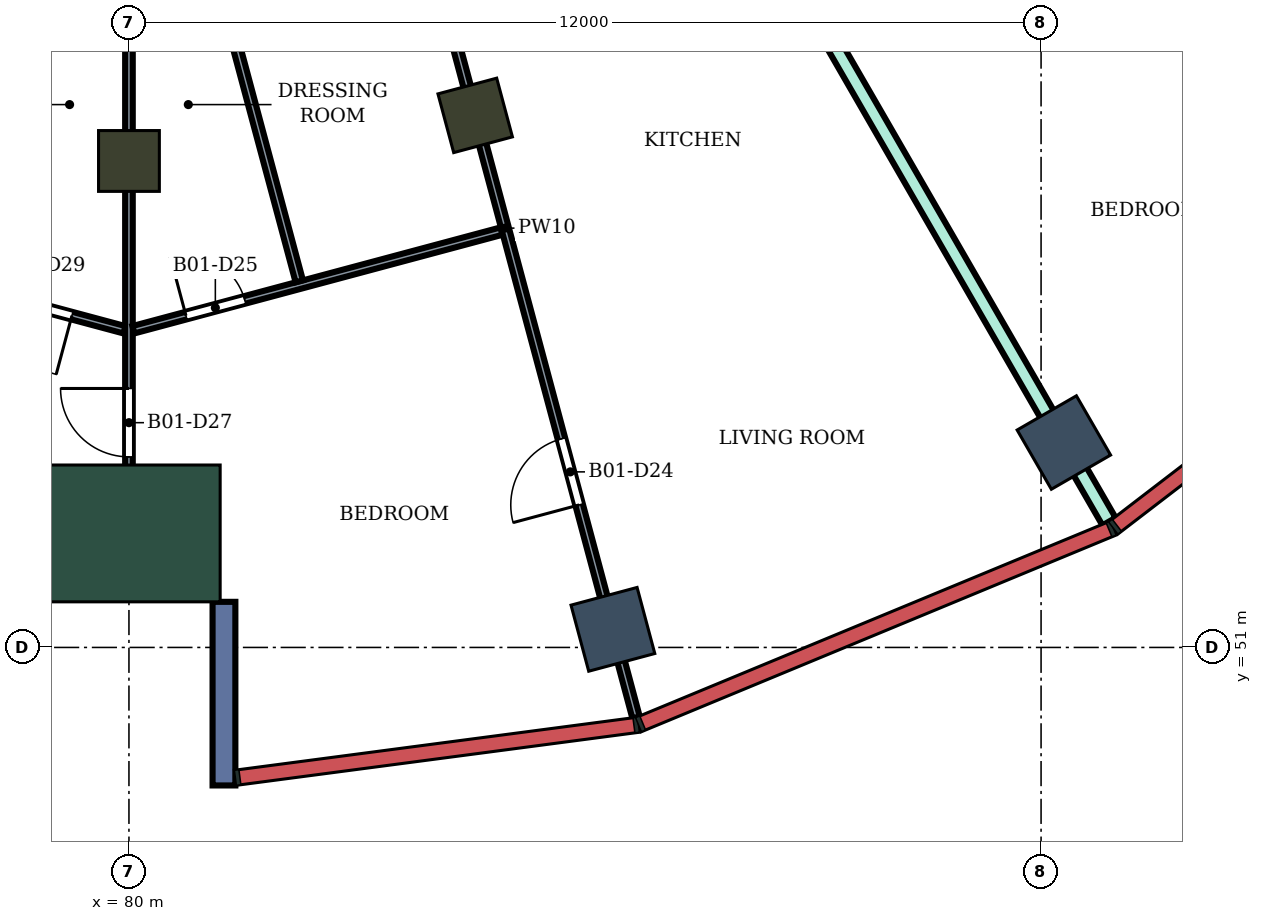
"""IFC4 building model, lengths in metres.
Left out: names, types, materials, properties, quantities, classifications, styles, units other than length and angle.
Written with IfcOpenShell. Run it as: python <this file> out.ifc"""

import sys

from ifc_helpers import new_model, si_unit, direction, frame, frame_2d, origin, origin_2d, place, context, subcontext, project, spatial, rectangle, extrude, element, fill, save


model = new_model("IFC4")
c1 = context("Model", 3, precision=1e-05, world=origin(), true_north=direction((0.0, 1.0)))
c2 = subcontext(c1, "Body", "Model", "MODEL_VIEW")
j1 = project(units=[si_unit("LENGTHUNIT", "METRE"), si_unit("PLANEANGLEUNIT", "RADIAN")], contexts=[c1])
p1 = place(None, origin())
s1 = spatial("IfcSite", under=j1, at=p1, CompositionType="ELEMENT")
p2 = place(p1, origin())
s2 = spatial("IfcBuilding", under=s1, at=p2, CompositionType="ELEMENT")
p3 = place(p2, frame((0.0, 0.0, 216.7)))
s3 = spatial("IfcBuildingStorey", under=s2, at=p3, CompositionType="ELEMENT", Elevation=216.7)
for number, where, z_axis, x_axis in (
    (1, (86.367, 51.238, 0.0), (0.0, 0.0, 1.0), (0.259, -0.966, 0.0)),
    (2, (92.3, 53.696, 0.0), (0.0, 0.0, 1.0), (0.5, -0.866, 0.0)),
):
    element("IfcColumn", number, at=place(p3, frame(where, z_axis=z_axis, x_axis=x_axis)), inside=s3, PredefinedType="COLUMN", context=c2, shape_type="SweptSolid", body=[
        extrude(rectangle(XDim=0.9, YDim=0.9, at=origin_2d()), origin(), (0.0, 0.0, 1.0), 4.2),
    ])
for number, where, z_axis, x_axis in (
    (3, (80.0, 57.4, 0.0), (0.0, 0.0, 1.0), (0.0, -1.0, 0.0)),
    (4, (84.555, 58.0, 0.0), (0.0, 0.0, 1.0), (0.259, -0.966, 0.0)),
):
    element("IfcColumn", number, at=place(p3, frame(where, z_axis=z_axis, x_axis=x_axis)), inside=s3, PredefinedType="COLUMN", context=c2, shape_type="SweptSolid", body=[
        extrude(rectangle(XDim=0.8, YDim=0.8, at=origin_2d()), origin(), (0.0, 0.0, 1.0), 4.2),
    ])
p4 = place(p3, frame((80.0, 52.5, 0.0), z_axis=(0.0, 0.0, 1.0), x_axis=(0.0, -1.0, 0.0)))
e5 = element("IfcColumn", 5, at=p4, inside=s3, PredefinedType="COLUMN", context=c2, shape_type="SweptSolid", body=[
    extrude(rectangle(XDim=1.8, YDim=2.4, at=origin_2d()), origin(), (0.0, 0.0, 1.0), 4.2),
])
p5 = place(p3, frame((81.25, 51.6, 0.0), z_axis=(0.0, 0.0, 1.0), x_axis=(0.0, -1.0, 0.0)))
e6 = element("IfcWall", 6, at=p5, inside=s3, PredefinedType="NOTDEFINED", context=c2, shape_type="SweptSolid", body=[
    extrude(rectangle(XDim=2.416, YDim=0.3, at=frame_2d((1.208, 0.0))), origin(), (0.0, 0.0, 1.0), 4.2),
])
p6 = place(p3, frame((86.463, 63.8, 0.0), z_axis=(0.0, 0.0, 1.0), x_axis=(0.499827034849, -0.866125242234, 0.0)))
e7 = element("IfcWall", 7, at=p6, inside=s3, PredefinedType="PARTITIONING", context=c2, shape_type="SweptSolid", body=[
    extrude(rectangle(XDim=12.866, YDim=0.2, at=frame_2d((6.433, 0.0))), origin(), (0.0, 0.0, 1.0), 3.75),
])
p7 = place(p3, frame((70.188, 57.794, 0.0), z_axis=(0.0, 0.0, 1.0), x_axis=(0.965894620005, -0.25893548047, 0.0)))
e8 = element("IfcWall", 8, at=p7, inside=s3, PredefinedType="PARTITIONING", context=c2, shape_type="SweptSolid", body=[
    extrude(rectangle(XDim=10.098, YDim=0.1, at=frame_2d((5.049, 0.0))), origin(), (0.0, 0.0, 1.0), 3.75),
])
p8 = place(p7, frame((6.034, 0.0, 0.0)))
e9 = element("IfcOpeningElement", 9, at=p8, cuts=e8, PredefinedType="OPENING", context=c2, shape_type="SweptSolid", body=[
    extrude(rectangle(XDim=0.8, YDim=2.1, at=frame_2d((0.4, 1.05))), frame((0.0, 0.06, 0.0), z_axis=(0.0, -1.0, 0.0), x_axis=(1.0, 0.0, 0.0)), (0.0, 0.0, 1.0), 0.12),
])
p9 = place(p7, frame((8.581, 0.0, 0.0)))
e10 = element("IfcOpeningElement", 10, at=p9, cuts=e8, PredefinedType="OPENING", context=c2, shape_type="SweptSolid", body=[
    extrude(rectangle(XDim=0.8, YDim=2.1, at=frame_2d((0.4, 1.05))), frame((0.0, 0.06, 0.0), z_axis=(0.0, -1.0, 0.0), x_axis=(1.0, 0.0, 0.0)), (0.0, 0.0, 1.0), 0.12),
])
p10 = place(p7, frame((1.156, 0.0, 0.0)))
e11 = element("IfcOpeningElement", 11, at=p10, cuts=e8, PredefinedType="OPENING", context=c2, shape_type="SweptSolid", body=[
    extrude(rectangle(XDim=0.9, YDim=2.1, at=frame_2d((0.45, 1.05))), frame((0.0, 0.06, 0.0), z_axis=(0.0, -1.0, 0.0), x_axis=(1.0, 0.0, 0.0)), (0.0, 0.0, 1.0), 0.12),
])
p11 = place(p3, frame((77.759, 55.816, 0.0), z_axis=(0.0, 0.0, 1.0), x_axis=(0.258802763352, 0.965930188824, 0.0)))
e12 = element("IfcWall", 12, at=p11, inside=s3, PredefinedType="PARTITIONING", context=c2, shape_type="SweptSolid", body=[
    extrude(rectangle(XDim=6.65, YDim=0.1, at=frame_2d((3.325, 0.0))), origin(), (0.0, 0.0, 1.0), 3.75),
])
p12 = place(p3, frame((80.0, 51.8, 0.0), z_axis=(0.0, 0.0, 1.0), x_axis=(0.0, 1.0, 0.0)))
e13 = element("IfcWall", 13, at=p12, inside=s3, PredefinedType="PARTITIONING", context=c2, shape_type="SweptSolid", body=[
    extrude(rectangle(XDim=10.404, YDim=0.1, at=frame_2d((5.202, 0.0))), origin(), (0.0, 0.0, 1.0), 3.75),
])
p13 = place(p12, frame((1.707, 0.0, 0.0)))
e14 = element("IfcOpeningElement", 14, at=p13, cuts=e13, PredefinedType="OPENING", context=c2, shape_type="SweptSolid", body=[
    extrude(rectangle(XDim=0.9, YDim=2.1, at=frame_2d((0.45, 1.05))), frame((0.0, 0.06, 0.0), z_axis=(0.0, -1.0, 0.0), x_axis=(1.0, 0.0, 0.0)), (0.0, 0.0, 1.0), 0.12),
])
p14 = place(p3, frame((80.058, 55.179, 0.0), z_axis=(0.0, 0.0, 1.0), x_axis=(0.965917403523, 0.258850477246, 0.0)))
e15 = element("IfcWall", 15, at=p14, inside=s3, PredefinedType="PARTITIONING", context=c2, shape_type="SweptSolid", body=[
    extrude(rectangle(XDim=5.014, YDim=0.1, at=frame_2d((2.507, 0.0))), origin(), (0.0, 0.0, 1.0), 3.75),
])
p15 = place(p14, frame((0.717, 0.0, 0.0)))
e16 = element("IfcOpeningElement", 16, at=p15, cuts=e15, PredefinedType="OPENING", context=c2, shape_type="SweptSolid", body=[
    extrude(rectangle(XDim=0.8, YDim=2.1, at=frame_2d((0.4, 1.05))), frame((0.0, 0.06, 0.0), z_axis=(0.0, -1.0, 0.0), x_axis=(1.0, 0.0, 0.0)), (0.0, 0.0, 1.0), 0.12),
])
p16 = place(p3, frame((80.52, 62.24, 0.0), z_axis=(0.0, 0.0, 1.0), x_axis=(0.258802763352, -0.965930188824, 0.0)))
e17 = element("IfcWall", 17, at=p16, inside=s3, PredefinedType="PARTITIONING", context=c2, shape_type="SweptSolid", body=[
    extrude(rectangle(XDim=6.65, YDim=0.1, at=frame_2d((3.325, 0.0))), origin(), (0.0, 0.0, 1.0), 3.75),
])
p17 = place(p3, frame((83.224, 62.954, 0.0), z_axis=(0.0, 0.0, 1.0), x_axis=(0.258647574365, -0.965971755423, 0.0)))
e18 = element("IfcWall", 18, at=p17, inside=s3, PredefinedType="PARTITIONING", context=c2, shape_type="SweptSolid", body=[
    extrude(rectangle(XDim=13.328, YDim=0.1, at=frame_2d((6.664, 0.0))), origin(), (0.0, 0.0, 1.0), 3.75),
])
p18 = place(p17, frame((9.534, 0.0, 0.0)))
e19 = element("IfcOpeningElement", 19, at=p18, cuts=e18, PredefinedType="OPENING", context=c2, shape_type="SweptSolid", body=[
    extrude(rectangle(XDim=0.9, YDim=2.1, at=frame_2d((0.45, 1.05))), frame((0.0, 0.06, 0.0), z_axis=(0.0, -1.0, 0.0), x_axis=(1.0, 0.0, 0.0)), (0.0, 0.0, 1.0), 0.12),
])
p19 = place(p17, frame((2.89, 0.0, 0.0)))
e20 = element("IfcOpeningElement", 20, at=p19, cuts=e18, PredefinedType="OPENING", context=c2, shape_type="SweptSolid", body=[
    extrude(rectangle(XDim=0.8, YDim=2.1, at=frame_2d((0.4, 1.05))), frame((0.0, 0.06, 0.0), z_axis=(0.0, -1.0, 0.0), x_axis=(1.0, 0.0, 0.0)), (0.0, 0.0, 1.0), 0.12),
])
p20 = place(p3, frame((90.236, 64.758, 0.0), z_axis=(0.0, 0.0, 1.0), x_axis=(0.706938769128, -0.707274753334, 0.0)))
e21 = element("IfcWall", 21, at=p20, inside=s3, PredefinedType="PARTITIONING", context=c2, shape_type="SweptSolid", body=[
    extrude(rectangle(XDim=8.72, YDim=0.1, at=frame_2d((4.36, 0.0))), origin(), (0.0, 0.0, 1.0), 3.75),
])
p21 = place(p20, frame((6.115, 0.0, 0.0)))
e22 = element("IfcOpeningElement", 22, at=p21, cuts=e21, PredefinedType="OPENING", context=c2, shape_type="SweptSolid", body=[
    extrude(rectangle(XDim=0.9, YDim=2.1, at=frame_2d((0.45, 1.05))), frame((0.0, 0.06, 0.0), z_axis=(0.0, -1.0, 0.0), x_axis=(1.0, 0.0, 0.0)), (0.0, 0.0, 1.0), 0.12),
])
p22 = place(p20, frame((1.817, 0.0, 0.0)))
e23 = element("IfcOpeningElement", 23, at=p22, cuts=e21, PredefinedType="OPENING", context=c2, shape_type="SweptSolid", body=[
    extrude(rectangle(XDim=0.8, YDim=2.1, at=frame_2d((0.4, 1.05))), frame((0.0, 0.06, 0.0), z_axis=(0.0, -1.0, 0.0), x_axis=(1.0, 0.0, 0.0)), (0.0, 0.0, 1.0), 0.12),
])
p23 = place(p18, frame((0.9, 0.0, 0.0), z_axis=(0.0, 0.0, 1.0), x_axis=(-1.0, 0.0, 0.0)))
e24 = element("IfcDoor", 24, at=p23, inside=s3, OperationType="SINGLE_SWING_LEFT", PredefinedType="DOOR", context=c2, shape_type="SweptSolid", body=[
    extrude(rectangle(XDim=0.9, YDim=2.1, at=frame_2d((0.45, 1.05))), frame((0.0, 0.025, 0.0), z_axis=(0.0, -1.0, 0.0), x_axis=(1.0, 0.0, 0.0)), (0.0, 0.0, 1.0), 0.05),
])
fill(e19, e24)
p24 = place(p15, origin())
e25 = element("IfcDoor", 25, at=p24, inside=s3, OperationType="SINGLE_SWING_LEFT", PredefinedType="DOOR", context=c2, shape_type="SweptSolid", body=[
    extrude(rectangle(XDim=0.8, YDim=2.1, at=frame_2d((0.4, 1.05))), frame((0.0, 0.025, 0.0), z_axis=(0.0, -1.0, 0.0), x_axis=(1.0, 0.0, 0.0)), (0.0, 0.0, 1.0), 0.05),
])
fill(e16, e25)
p25 = place(p13, origin())
e26 = element("IfcDoor", 26, at=p25, inside=s3, OperationType="SINGLE_SWING_RIGHT", PredefinedType="DOOR", context=c2, shape_type="SweptSolid", body=[
    extrude(rectangle(XDim=0.9, YDim=2.1, at=frame_2d((0.45, 1.05))), frame((0.0, 0.025, 0.0), z_axis=(0.0, -1.0, 0.0), x_axis=(1.0, 0.0, 0.0)), (0.0, 0.0, 1.0), 0.05),
])
fill(e14, e26)
p26 = place(p9, frame((0.8, 0.0, 0.0), z_axis=(0.0, 0.0, 1.0), x_axis=(-1.0, 0.0, 0.0)))
e27 = element("IfcDoor", 27, at=p26, inside=s3, OperationType="SINGLE_SWING_LEFT", PredefinedType="DOOR", context=c2, shape_type="SweptSolid", body=[
    extrude(rectangle(XDim=0.8, YDim=2.1, at=frame_2d((0.4, 1.05))), frame((0.0, 0.025, 0.0), z_axis=(0.0, -1.0, 0.0), x_axis=(1.0, 0.0, 0.0)), (0.0, 0.0, 1.0), 0.05),
])
fill(e10, e27)
save(model, sys.argv[1])
